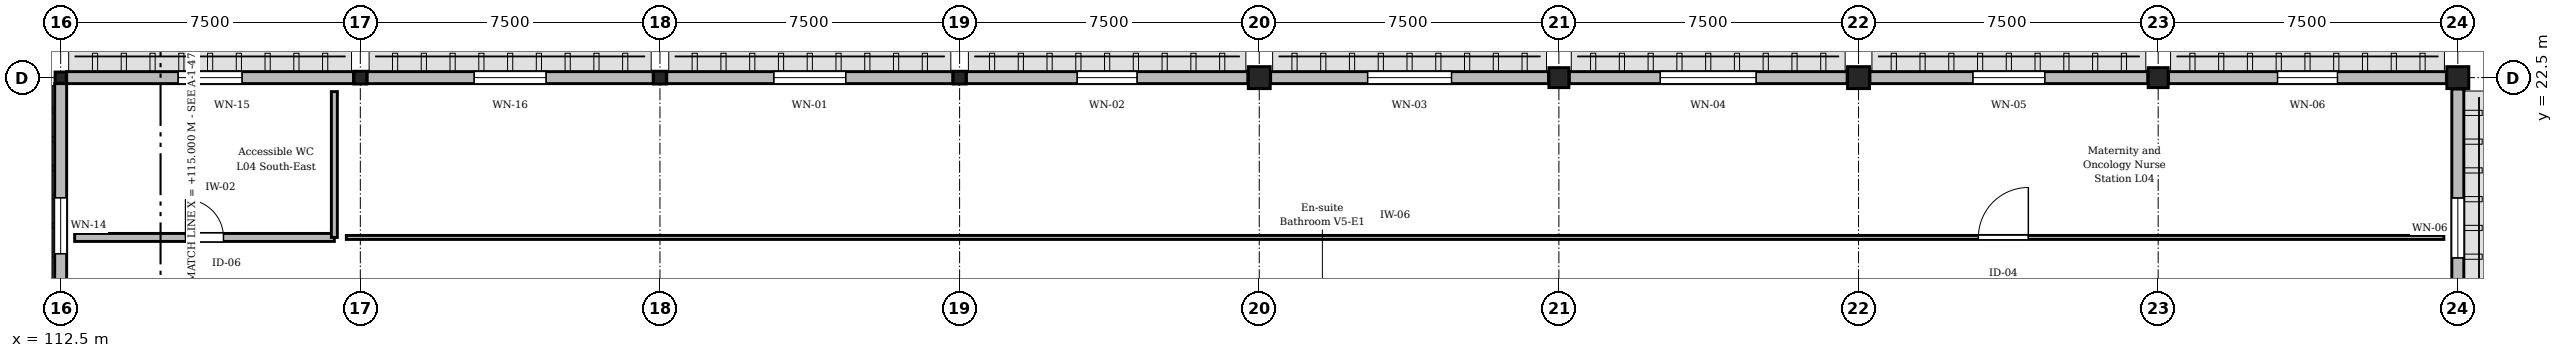
"""IFC4 building model, lengths in metres.
Left out: names, types, materials, properties, quantities, classifications, styles, units other than length and angle.
Written with IfcOpenShell. Run it as: python <this file> out.ifc"""

import sys

from ifc_helpers import new_model, si_unit, direction, frame, frame_2d, origin, origin_2d, place, context, subcontext, project, spatial, rectangle, extrude, element, fill, save


model = new_model("IFC4")
c1 = context("Model", 3, precision=1e-05, world=origin(), true_north=direction((0.0, 1.0)))
c2 = subcontext(c1, "Body", "Model", "MODEL_VIEW")
j1 = project(units=[si_unit("LENGTHUNIT", "METRE"), si_unit("PLANEANGLEUNIT", "RADIAN")], contexts=[c1])
p1 = place(None, origin())
s1 = spatial("IfcSite", under=j1, at=p1, CompositionType="ELEMENT")
p2 = place(p1, origin())
s2 = spatial("IfcBuilding", under=s1, at=p2, CompositionType="ELEMENT")
p3 = place(p2, frame((0.0, 0.0, 17.85)))
s3 = spatial("IfcBuildingStorey", under=s2, at=p3, CompositionType="ELEMENT", Elevation=17.85)
p4 = place(p3, frame((112.5, 22.5, 0.0), z_axis=(0.0, 0.0, 1.0), x_axis=(1.0, 0.0, 0.0)))
e1 = element("IfcColumn", 1, at=p4, inside=s3, PredefinedType="COLUMN", context=c2, shape_type="SweptSolid", body=[
    extrude(rectangle(XDim=0.28, YDim=0.28, at=origin_2d()), origin(), (0.0, 0.0, 1.0), 4.05),
])
for number, where, z_axis, x_axis in (
    (2, (120.0, 22.5, 0.0), (0.0, 0.0, 1.0), (1.0, 0.0, 0.0)),
    (3, (127.5, 22.5, 0.0), (0.0, 0.0, 1.0), (1.0, 0.0, 0.0)),
    (4, (135.0, 22.5, 0.0), (0.0, 0.0, 1.0), (1.0, 0.0, 0.0)),
):
    element("IfcColumn", number, at=place(p3, frame(where, z_axis=z_axis, x_axis=x_axis)), inside=s3, PredefinedType="COLUMN", context=c2, shape_type="SweptSolid", body=[
        extrude(rectangle(XDim=0.32, YDim=0.32, at=origin_2d()), origin(), (0.0, 0.0, 1.0), 4.05),
    ])
p5 = place(p3, frame((142.5, 22.5, 0.0), z_axis=(0.0, 0.0, 1.0), x_axis=(1.0, 0.0, 0.0)))
e5 = element("IfcColumn", 5, at=p5, inside=s3, PredefinedType="COLUMN", context=c2, shape_type="SweptSolid", body=[
    extrude(rectangle(XDim=0.55, YDim=0.55, at=origin_2d()), origin(), (0.0, 0.0, 1.0), 4.05),
])
p6 = place(p3, frame((150.0, 22.5, 0.0), z_axis=(0.0, 0.0, 1.0), x_axis=(1.0, 0.0, 0.0)))
e6 = element("IfcColumn", 6, at=p6, inside=s3, PredefinedType="COLUMN", context=c2, shape_type="SweptSolid", body=[
    extrude(rectangle(XDim=0.5, YDim=0.5, at=origin_2d()), origin(), (0.0, 0.0, 1.0), 4.05),
])
p7 = place(p3, frame((157.5, 22.5, 0.0), z_axis=(0.0, 0.0, 1.0), x_axis=(1.0, 0.0, 0.0)))
e7 = element("IfcColumn", 7, at=p7, inside=s3, PredefinedType="COLUMN", context=c2, shape_type="SweptSolid", body=[
    extrude(rectangle(XDim=0.55, YDim=0.55, at=origin_2d()), origin(), (0.0, 0.0, 1.0), 4.05),
])
p8 = place(p3, frame((165.0, 22.5, 0.0), z_axis=(0.0, 0.0, 1.0), x_axis=(1.0, 0.0, 0.0)))
e8 = element("IfcColumn", 8, at=p8, inside=s3, PredefinedType="COLUMN", context=c2, shape_type="SweptSolid", body=[
    extrude(rectangle(XDim=0.5, YDim=0.5, at=origin_2d()), origin(), (0.0, 0.0, 1.0), 4.05),
])
p9 = place(p3, frame((172.5, 22.5, 0.0), z_axis=(0.0, 0.0, 1.0), x_axis=(1.0, 0.0, 0.0)))
e9 = element("IfcColumn", 9, at=p9, inside=s3, PredefinedType="COLUMN", context=c2, shape_type="SweptSolid", body=[
    extrude(rectangle(XDim=0.55, YDim=0.55, at=origin_2d()), origin(), (0.0, 0.0, 1.0), 4.05),
])
p10 = place(p3, frame((112.65, 22.5, 0.0), z_axis=(0.0, 0.0, 1.0), x_axis=(1.0, 0.0, 0.0)))
e10 = element("IfcWall", 10, at=p10, inside=s3, PredefinedType="STANDARD", context=c2, shape_type="SweptSolid", body=[
    extrude(rectangle(XDim=7.18, YDim=0.3, at=frame_2d((3.59, 0.0))), origin(), (0.0, 0.0, 1.0), 3.17),
])
p11 = place(p10, frame((2.79, 0.0, 0.9)))
e11 = element("IfcOpeningElement", 11, at=p11, cuts=e10, PredefinedType="OPENING", context=c2, shape_type="SweptSolid", body=[
    extrude(rectangle(XDim=1.6, YDim=1.8, at=frame_2d((0.8, 0.9))), frame((0.0, 0.16, 0.0), z_axis=(0.0, -1.0, 0.0), x_axis=(1.0, 0.0, 0.0)), (0.0, 0.0, 1.0), 0.32),
])
p12 = place(p3, frame((112.5, 15.235, 0.0), z_axis=(0.0, 0.0, 1.0), x_axis=(0.0, 1.0, 0.0)))
e12 = element("IfcWall", 12, at=p12, inside=s3, PredefinedType="STANDARD", context=c2, shape_type="SweptSolid", body=[
    extrude(rectangle(XDim=7.115, YDim=0.3, at=frame_2d((3.558, 0.0))), origin(), (0.0, 0.0, 1.0), 3.17),
])
p13 = place(p12, frame((2.857, 0.0, 0.9)))
e13 = element("IfcOpeningElement", 13, at=p13, cuts=e12, PredefinedType="OPENING", context=c2, shape_type="SweptSolid", body=[
    extrude(rectangle(XDim=1.4, YDim=1.8, at=frame_2d((0.7, 0.9))), frame((0.0, 0.16, 0.0), z_axis=(0.0, -1.0, 0.0), x_axis=(1.0, 0.0, 0.0)), (0.0, 0.0, 1.0), 0.32),
])
p14 = place(p3, frame((120.17, 22.5, 0.0), z_axis=(0.0, 0.0, 1.0), x_axis=(1.0, 0.0, 0.0)))
e14 = element("IfcWall", 14, at=p14, inside=s3, PredefinedType="STANDARD", context=c2, shape_type="SweptSolid", body=[
    extrude(rectangle(XDim=7.16, YDim=0.3, at=frame_2d((3.58, 0.0))), origin(), (0.0, 0.0, 1.0), 3.17),
])
p15 = place(p14, frame((2.68, 0.0, 0.9)))
e15 = element("IfcOpeningElement", 15, at=p15, cuts=e14, PredefinedType="OPENING", context=c2, shape_type="SweptSolid", body=[
    extrude(rectangle(XDim=1.8, YDim=1.8, at=frame_2d((0.9, 0.9))), frame((0.0, 0.16, 0.0), z_axis=(0.0, -1.0, 0.0), x_axis=(1.0, 0.0, 0.0)), (0.0, 0.0, 1.0), 0.32),
])
p16 = place(p3, frame((127.67, 22.5, 0.0), z_axis=(0.0, 0.0, 1.0), x_axis=(1.0, 0.0, 0.0)))
e16 = element("IfcWall", 16, at=p16, inside=s3, PredefinedType="STANDARD", context=c2, shape_type="SweptSolid", body=[
    extrude(rectangle(XDim=7.16, YDim=0.3, at=frame_2d((3.58, 0.0))), origin(), (0.0, 0.0, 1.0), 3.17),
])
p17 = place(p16, frame((2.68, 0.0, 0.9)))
e17 = element("IfcOpeningElement", 17, at=p17, cuts=e16, PredefinedType="OPENING", context=c2, shape_type="SweptSolid", body=[
    extrude(rectangle(XDim=1.8, YDim=1.99, at=frame_2d((0.9, 0.995))), frame((0.0, 0.16, 0.0), z_axis=(0.0, -1.0, 0.0), x_axis=(1.0, 0.0, 0.0)), (0.0, 0.0, 1.0), 0.32),
])
p18 = place(p3, frame((135.17, 22.5, 0.0), z_axis=(0.0, 0.0, 1.0), x_axis=(1.0, 0.0, 0.0)))
e18 = element("IfcWall", 18, at=p18, inside=s3, PredefinedType="STANDARD", context=c2, shape_type="SweptSolid", body=[
    extrude(rectangle(XDim=7.045, YDim=0.3, at=frame_2d((3.522, 0.0))), origin(), (0.0, 0.0, 1.0), 3.17),
])
p19 = place(p18, frame((2.772, 0.0, 0.9)))
e19 = element("IfcOpeningElement", 19, at=p19, cuts=e18, PredefinedType="OPENING", context=c2, shape_type="SweptSolid", body=[
    extrude(rectangle(XDim=1.5, YDim=1.99, at=frame_2d((0.75, 0.995))), frame((0.0, 0.16, 0.0), z_axis=(0.0, -1.0, 0.0), x_axis=(1.0, 0.0, 0.0)), (0.0, 0.0, 1.0), 0.32),
])
p20 = place(p3, frame((142.785, 22.5, 0.0), z_axis=(0.0, 0.0, 1.0), x_axis=(1.0, 0.0, 0.0)))
e20 = element("IfcWall", 20, at=p20, inside=s3, PredefinedType="STANDARD", context=c2, shape_type="SweptSolid", body=[
    extrude(rectangle(XDim=6.955, YDim=0.3, at=frame_2d((3.478, 0.0))), origin(), (0.0, 0.0, 1.0), 3.17),
])
p21 = place(p20, frame((2.427, 0.0, 0.9)))
e21 = element("IfcOpeningElement", 21, at=p21, cuts=e20, PredefinedType="OPENING", context=c2, shape_type="SweptSolid", body=[
    extrude(rectangle(XDim=2.1, YDim=1.99, at=frame_2d((1.05, 0.995))), frame((0.0, 0.16, 0.0), z_axis=(0.0, -1.0, 0.0), x_axis=(1.0, 0.0, 0.0)), (0.0, 0.0, 1.0), 0.32),
])
p22 = place(p3, frame((150.26, 22.5, 0.0), z_axis=(0.0, 0.0, 1.0), x_axis=(1.0, 0.0, 0.0)))
e22 = element("IfcWall", 22, at=p22, inside=s3, PredefinedType="STANDARD", context=c2, shape_type="SweptSolid", body=[
    extrude(rectangle(XDim=6.955, YDim=0.3, at=frame_2d((3.478, 0.0))), origin(), (0.0, 0.0, 1.0), 3.17),
])
p23 = place(p22, frame((2.278, 0.0, 0.9)))
e23 = element("IfcOpeningElement", 23, at=p23, cuts=e22, PredefinedType="OPENING", context=c2, shape_type="SweptSolid", body=[
    extrude(rectangle(XDim=2.4, YDim=1.99, at=frame_2d((1.2, 0.995))), frame((0.0, 0.16, 0.0), z_axis=(0.0, -1.0, 0.0), x_axis=(1.0, 0.0, 0.0)), (0.0, 0.0, 1.0), 0.32),
])
p24 = place(p3, frame((157.785, 22.5, 0.0), z_axis=(0.0, 0.0, 1.0), x_axis=(1.0, 0.0, 0.0)))
e24 = element("IfcWall", 24, at=p24, inside=s3, PredefinedType="STANDARD", context=c2, shape_type="SweptSolid", body=[
    extrude(rectangle(XDim=6.955, YDim=0.3, at=frame_2d((3.478, 0.0))), origin(), (0.0, 0.0, 1.0), 3.17),
])
p25 = place(p24, frame((2.577, 0.0, 0.9)))
e25 = element("IfcOpeningElement", 25, at=p25, cuts=e24, PredefinedType="OPENING", context=c2, shape_type="SweptSolid", body=[
    extrude(rectangle(XDim=1.8, YDim=1.99, at=frame_2d((0.9, 0.995))), frame((0.0, 0.16, 0.0), z_axis=(0.0, -1.0, 0.0), x_axis=(1.0, 0.0, 0.0)), (0.0, 0.0, 1.0), 0.32),
])
p26 = place(p3, frame((165.26, 22.5, 0.0), z_axis=(0.0, 0.0, 1.0), x_axis=(1.0, 0.0, 0.0)))
e26 = element("IfcWall", 26, at=p26, inside=s3, PredefinedType="STANDARD", context=c2, shape_type="SweptSolid", body=[
    extrude(rectangle(XDim=6.955, YDim=0.3, at=frame_2d((3.478, 0.0))), origin(), (0.0, 0.0, 1.0), 3.17),
])
p27 = place(p26, frame((2.728, 0.0, 0.9)))
e27 = element("IfcOpeningElement", 27, at=p27, cuts=e26, PredefinedType="OPENING", context=c2, shape_type="SweptSolid", body=[
    extrude(rectangle(XDim=1.5, YDim=1.99, at=frame_2d((0.75, 0.995))), frame((0.0, 0.16, 0.0), z_axis=(0.0, -1.0, 0.0), x_axis=(1.0, 0.0, 0.0)), (0.0, 0.0, 1.0), 0.32),
])
p28 = place(p3, frame((172.5, 22.215, 0.0), z_axis=(0.0, 0.0, 1.0), x_axis=(0.0, -1.0, 0.0)))
e28 = element("IfcWall", 28, at=p28, inside=s3, PredefinedType="STANDARD", context=c2, shape_type="SweptSolid", body=[
    extrude(rectangle(XDim=6.955, YDim=0.3, at=frame_2d((3.478, 0.0))), origin(), (0.0, 0.0, 1.0), 3.17),
])
p29 = place(p28, frame((2.728, 0.0, 0.9)))
e29 = element("IfcOpeningElement", 29, at=p29, cuts=e28, PredefinedType="OPENING", context=c2, shape_type="SweptSolid", body=[
    extrude(rectangle(XDim=1.5, YDim=1.99, at=frame_2d((0.75, 0.995))), frame((0.0, 0.16, 0.0), z_axis=(0.0, -1.0, 0.0), x_axis=(1.0, 0.0, 0.0)), (0.0, 0.0, 1.0), 0.32),
])
p30 = place(p3, frame((112.85, 18.5, 0.0), z_axis=(0.0, 0.0, 1.0), x_axis=(1.0, 0.0, 0.0)))
e30 = element("IfcWall", 30, at=p30, inside=s3, PredefinedType="STANDARD", context=c2, shape_type="SweptSolid", body=[
    extrude(rectangle(XDim=6.5, YDim=0.2, at=frame_2d((3.25, 0.0))), origin(), (0.0, 0.0, 1.0), 3.755),
])
p31 = place(p30, frame((2.775, 0.0, 0.0)))
e31 = element("IfcOpeningElement", 31, at=p31, cuts=e30, PredefinedType="OPENING", context=c2, shape_type="SweptSolid", body=[
    extrude(rectangle(XDim=0.95, YDim=2.15, at=frame_2d((0.475, 1.075))), frame((0.0, 0.11, 0.0), z_axis=(0.0, -1.0, 0.0), x_axis=(1.0, 0.0, 0.0)), (0.0, 0.0, 1.0), 0.22),
])
p32 = place(p3, frame((119.65, 18.5, 0.0), z_axis=(0.0, 0.0, 1.0), x_axis=(1.0, 0.0, 0.0)))
e32 = element("IfcWall", 32, at=p32, inside=s3, PredefinedType="PARTITIONING", context=c2, shape_type="SweptSolid", body=[
    extrude(rectangle(XDim=52.5, YDim=0.1, at=frame_2d((26.25, 0.0))), origin(), (0.0, 0.0, 1.0), 3.755),
])
p33 = place(p32, frame((40.85, 0.0, 0.0)))
e33 = element("IfcOpeningElement", 33, at=p33, cuts=e32, PredefinedType="OPENING", context=c2, shape_type="SweptSolid", body=[
    extrude(rectangle(XDim=1.25, YDim=2.2, at=frame_2d((0.625, 1.1))), frame((0.0, 0.06, 0.0), z_axis=(0.0, -1.0, 0.0), x_axis=(1.0, 0.0, 0.0)), (0.0, 0.0, 1.0), 0.12),
])
p34 = place(p3, frame((119.35, 18.5, 0.0), z_axis=(0.0, 0.0, 1.0), x_axis=(0.0, 1.0, 0.0)))
e34 = element("IfcWall", 34, at=p34, inside=s3, PredefinedType="PARTITIONING", context=c2, shape_type="SweptSolid", body=[
    extrude(rectangle(XDim=3.65, YDim=0.15, at=frame_2d((1.825, 0.0))), origin(), (0.0, 0.0, 1.0), 3.755),
])
p35 = place(p11, origin())
e35 = element("IfcWindow", 35, at=p35, inside=s3, PartitioningType="SINGLE_PANEL", PredefinedType="WINDOW", context=c2, shape_type="SweptSolid", body=[
    extrude(rectangle(XDim=1.6, YDim=1.8, at=frame_2d((0.8, 0.9))), frame((0.0, 0.03, 0.0), z_axis=(0.0, -1.0, 0.0), x_axis=(1.0, 0.0, 0.0)), (0.0, 0.0, 1.0), 0.06),
])
fill(e11, e35)
p36 = place(p13, origin())
e36 = element("IfcWindow", 36, at=p36, inside=s3, PartitioningType="SINGLE_PANEL", PredefinedType="WINDOW", context=c2, shape_type="SweptSolid", body=[
    extrude(rectangle(XDim=1.4, YDim=1.8, at=frame_2d((0.7, 0.9))), frame((0.0, 0.03, 0.0), z_axis=(0.0, -1.0, 0.0), x_axis=(1.0, 0.0, 0.0)), (0.0, 0.0, 1.0), 0.06),
])
fill(e13, e36)
p37 = place(p15, origin())
e37 = element("IfcWindow", 37, at=p37, inside=s3, PartitioningType="SINGLE_PANEL", PredefinedType="WINDOW", context=c2, shape_type="SweptSolid", body=[
    extrude(rectangle(XDim=1.8, YDim=1.8, at=frame_2d((0.9, 0.9))), frame((0.0, 0.03, 0.0), z_axis=(0.0, -1.0, 0.0), x_axis=(1.0, 0.0, 0.0)), (0.0, 0.0, 1.0), 0.06),
])
fill(e15, e37)
p38 = place(p17, origin())
e38 = element("IfcWindow", 38, at=p38, inside=s3, PartitioningType="SINGLE_PANEL", PredefinedType="WINDOW", context=c2, shape_type="SweptSolid", body=[
    extrude(rectangle(XDim=1.8, YDim=1.99, at=frame_2d((0.9, 0.995))), frame((0.0, 0.03, 0.0), z_axis=(0.0, -1.0, 0.0), x_axis=(1.0, 0.0, 0.0)), (0.0, 0.0, 1.0), 0.06),
])
fill(e17, e38)
p39 = place(p19, origin())
e39 = element("IfcWindow", 39, at=p39, inside=s3, PartitioningType="SINGLE_PANEL", PredefinedType="WINDOW", context=c2, shape_type="SweptSolid", body=[
    extrude(rectangle(XDim=1.5, YDim=1.99, at=frame_2d((0.75, 0.995))), frame((0.0, 0.03, 0.0), z_axis=(0.0, -1.0, 0.0), x_axis=(1.0, 0.0, 0.0)), (0.0, 0.0, 1.0), 0.06),
])
fill(e19, e39)
p40 = place(p21, origin())
e40 = element("IfcWindow", 40, at=p40, inside=s3, PartitioningType="SINGLE_PANEL", PredefinedType="WINDOW", context=c2, shape_type="SweptSolid", body=[
    extrude(rectangle(XDim=2.1, YDim=1.99, at=frame_2d((1.05, 0.995))), frame((0.0, 0.03, 0.0), z_axis=(0.0, -1.0, 0.0), x_axis=(1.0, 0.0, 0.0)), (0.0, 0.0, 1.0), 0.06),
])
fill(e21, e40)
p41 = place(p23, origin())
e41 = element("IfcWindow", 41, at=p41, inside=s3, PartitioningType="SINGLE_PANEL", PredefinedType="WINDOW", context=c2, shape_type="SweptSolid", body=[
    extrude(rectangle(XDim=2.4, YDim=1.99, at=frame_2d((1.2, 0.995))), frame((0.0, 0.03, 0.0), z_axis=(0.0, -1.0, 0.0), x_axis=(1.0, 0.0, 0.0)), (0.0, 0.0, 1.0), 0.06),
])
fill(e23, e41)
p42 = place(p25, origin())
e42 = element("IfcWindow", 42, at=p42, inside=s3, PartitioningType="SINGLE_PANEL", PredefinedType="WINDOW", context=c2, shape_type="SweptSolid", body=[
    extrude(rectangle(XDim=1.8, YDim=1.99, at=frame_2d((0.9, 0.995))), frame((0.0, 0.03, 0.0), z_axis=(0.0, -1.0, 0.0), x_axis=(1.0, 0.0, 0.0)), (0.0, 0.0, 1.0), 0.06),
])
fill(e25, e42)
p43 = place(p27, origin())
e43 = element("IfcWindow", 43, at=p43, inside=s3, PartitioningType="SINGLE_PANEL", PredefinedType="WINDOW", context=c2, shape_type="SweptSolid", body=[
    extrude(rectangle(XDim=1.5, YDim=1.99, at=frame_2d((0.75, 0.995))), frame((0.0, 0.03, 0.0), z_axis=(0.0, -1.0, 0.0), x_axis=(1.0, 0.0, 0.0)), (0.0, 0.0, 1.0), 0.06),
])
fill(e27, e43)
p44 = place(p29, origin())
e44 = element("IfcWindow", 44, at=p44, inside=s3, PartitioningType="SINGLE_PANEL", PredefinedType="WINDOW", context=c2, shape_type="SweptSolid", body=[
    extrude(rectangle(XDim=1.5, YDim=1.99, at=frame_2d((0.75, 0.995))), frame((0.0, 0.03, 0.0), z_axis=(0.0, -1.0, 0.0), x_axis=(1.0, 0.0, 0.0)), (0.0, 0.0, 1.0), 0.06),
])
fill(e29, e44)
p45 = place(p31, origin())
e45 = element("IfcDoor", 45, at=p45, inside=s3, OperationType="SINGLE_SWING_LEFT", PredefinedType="DOOR", context=c2, shape_type="SweptSolid", body=[
    extrude(rectangle(XDim=0.95, YDim=2.15, at=frame_2d((0.475, 1.075))), frame((0.0, 0.025, 0.0), z_axis=(0.0, -1.0, 0.0), x_axis=(1.0, 0.0, 0.0)), (0.0, 0.0, 1.0), 0.05),
])
fill(e31, e45)
p46 = place(p33, origin())
e46 = element("IfcDoor", 46, at=p46, inside=s3, OperationType="SINGLE_SWING_RIGHT", PredefinedType="DOOR", context=c2, shape_type="SweptSolid", body=[
    extrude(rectangle(XDim=1.25, YDim=2.2, at=frame_2d((0.625, 1.1))), frame((0.0, 0.025, 0.0), z_axis=(0.0, -1.0, 0.0), x_axis=(1.0, 0.0, 0.0)), (0.0, 0.0, 1.0), 0.05),
])
fill(e33, e46)
save(model, sys.argv[1])
